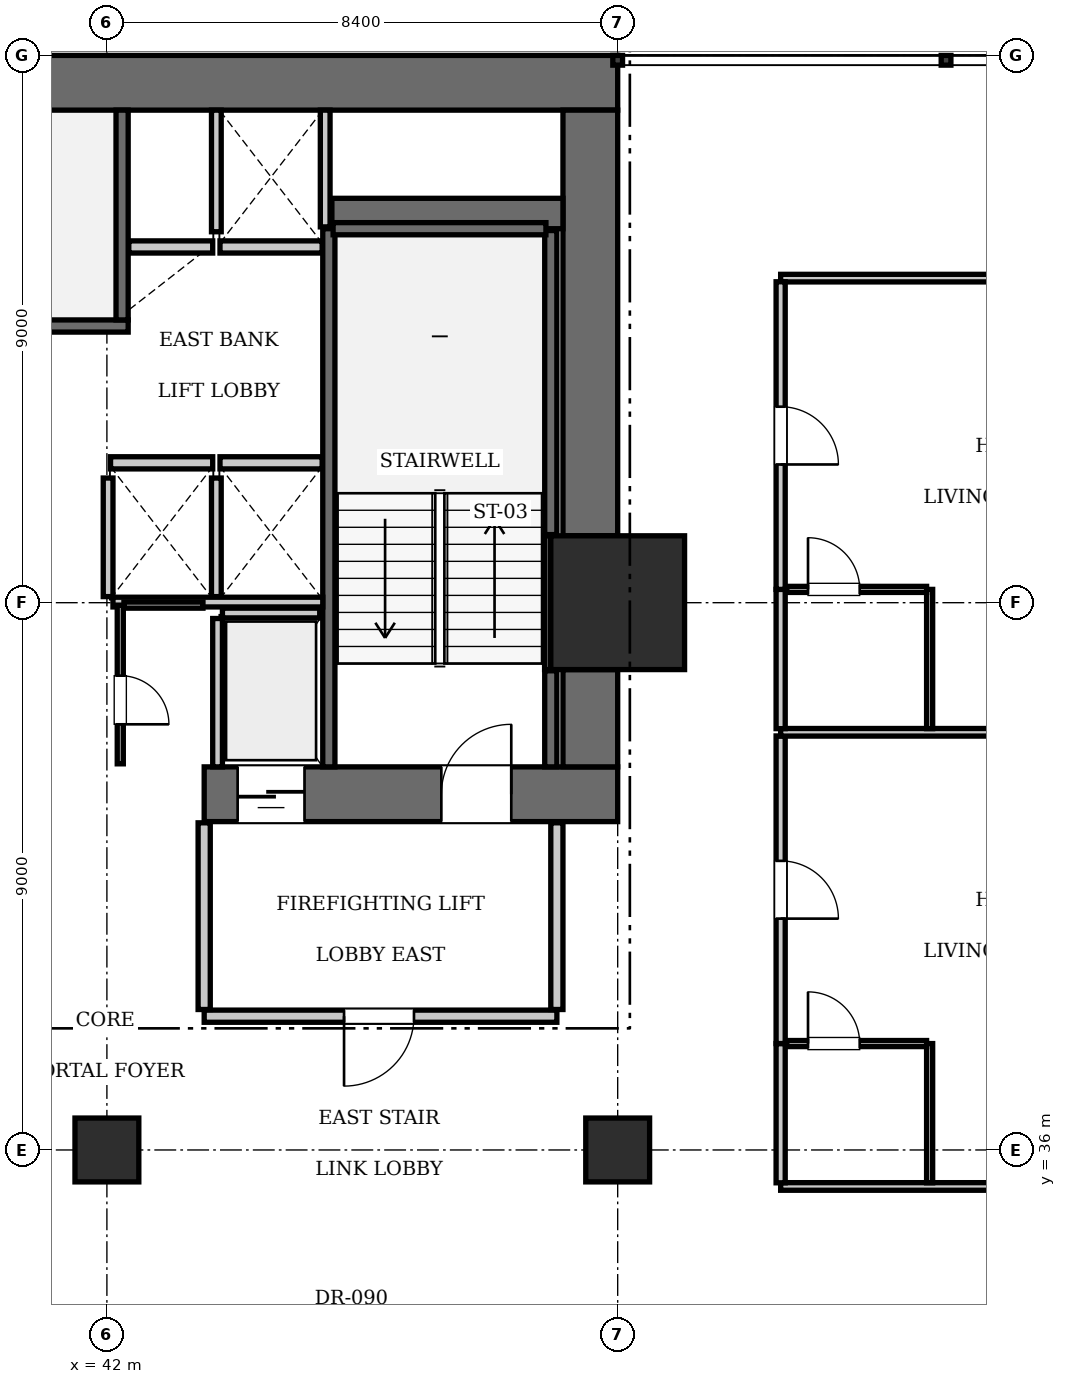
"""IFC4 building model, lengths in metres.
Left out: names, types, materials, properties, quantities, classifications, styles, units other than length and angle.
Written with IfcOpenShell. Run it as: python <this file> out.ifc"""

import sys

from ifc_helpers import new_model, si_unit, direction, frame, frame_2d, origin, origin_2d, place, context, subcontext, project, spatial, rectangle, extrude, element, fill, save


model = new_model("IFC4")
c1 = context("Model", 3, precision=1e-05, world=origin(), true_north=direction((0.0, 1.0)))
c2 = subcontext(c1, "Body", "Model", "MODEL_VIEW")
j1 = project(units=[si_unit("LENGTHUNIT", "METRE"), si_unit("PLANEANGLEUNIT", "RADIAN")], contexts=[c1])
p1 = place(None, origin())
s1 = spatial("IfcSite", under=j1, at=p1, CompositionType="ELEMENT")
p2 = place(p1, origin())
s2 = spatial("IfcBuilding", under=s1, at=p2, CompositionType="ELEMENT")
p3 = place(p2, frame((0.0, 0.0, 46.2)))
s3 = spatial("IfcBuildingStorey", under=s2, at=p3, CompositionType="ELEMENT", Elevation=46.2)
p4 = place(p3, frame((50.4, 45.0, 0.0), z_axis=(0.0, 0.0, 1.0), x_axis=(1.0, 0.0, 0.0)))
e1 = element("IfcColumn", 1, at=p4, inside=s3, PredefinedType="COLUMN", context=c2, shape_type="SweptSolid", body=[
    extrude(rectangle(XDim=2.2, YDim=2.2, at=origin_2d()), origin(), (0.0, 0.0, 1.0), 3.85),
])
p5 = place(p3, frame((25.2, 53.55, 0.0), z_axis=(0.0, 0.0, 1.0), x_axis=(1.0, 0.0, 0.0)))
e2 = element("IfcWall", 2, at=p5, inside=s3, PredefinedType="SHEAR", context=c2, shape_type="SweptSolid", body=[
    extrude(rectangle(XDim=25.2, YDim=0.9, at=frame_2d((12.6, 0.0))), origin(), (0.0, 0.0, 1.0), 3.85),
])
p6 = place(p3, frame((43.6, 41.85, 0.0), z_axis=(0.0, 0.0, 1.0), x_axis=(1.0, 0.0, 0.0)))
e3 = element("IfcWall", 3, at=p6, inside=s3, PredefinedType="SHEAR", context=c2, shape_type="SweptSolid", body=[
    extrude(rectangle(XDim=6.8, YDim=0.9, at=frame_2d((3.4, 0.0))), origin(), (0.0, 0.0, 1.0), 3.85),
])
p7 = place(p6, frame((3.9, 0.0, 0.0)))
e4 = element("IfcOpeningElement", 4, at=p7, cuts=e3, PredefinedType="OPENING", context=c2, shape_type="SweptSolid", body=[
    extrude(rectangle(XDim=1.15, YDim=2.15, at=frame_2d((0.575, 1.075))), frame((0.0, 0.46, 0.0), z_axis=(0.0, -1.0, 0.0), x_axis=(1.0, 0.0, 0.0)), (0.0, 0.0, 1.0), 0.92),
])
p8 = place(p6, frame((0.55, 0.0, 0.0)))
e5 = element("IfcOpeningElement", 5, at=p8, cuts=e3, PredefinedType="OPENING", context=c2, shape_type="SweptSolid", body=[
    extrude(rectangle(XDim=1.1, YDim=2.2, at=frame_2d((0.55, 1.1))), frame((0.0, 0.46, 0.0), z_axis=(0.0, -1.0, 0.0), x_axis=(1.0, 0.0, 0.0)), (0.0, 0.0, 1.0), 0.92),
])
p9 = place(p3, frame((49.95, 42.3, 0.0), z_axis=(0.0, 0.0, 1.0), x_axis=(0.0, 1.0, 0.0)))
e6 = element("IfcWall", 6, at=p9, inside=s3, PredefinedType="SHEAR", context=c2, shape_type="SweptSolid", body=[
    extrude(rectangle(XDim=1.6, YDim=0.9, at=frame_2d((0.8, 0.0))), origin(), (0.0, 0.0, 1.0), 3.85),
])
p10 = place(p3, frame((49.95, 46.1, 0.0), z_axis=(0.0, 0.0, 1.0), x_axis=(0.0, 1.0, 0.0)))
e7 = element("IfcWall", 7, at=p10, inside=s3, PredefinedType="SHEAR", context=c2, shape_type="SweptSolid", body=[
    extrude(rectangle(XDim=7.0, YDim=0.9, at=frame_2d((3.5, 0.0))), origin(), (0.0, 0.0, 1.0), 3.85),
])
p11 = place(p3, frame((45.7, 51.4, 0.0), z_axis=(0.0, 0.0, 1.0), x_axis=(1.0, 0.0, 0.0)))
e8 = element("IfcWall", 8, at=p11, inside=s3, PredefinedType="SHEAR", context=c2, shape_type="SweptSolid", body=[
    extrude(rectangle(XDim=3.8, YDim=0.5, at=frame_2d((1.9, 0.0))), origin(), (0.0, 0.0, 1.0), 3.85),
])
for number, where, z_axis, x_axis in (
    (9, (42.0, 36.0, 0.0), (0.0, 0.0, 1.0), (1.0, 0.0, 0.0)),
    (10, (50.4, 36.0, 0.0), (0.0, 0.0, 1.0), (1.0, 0.0, 0.0)),
):
    element("IfcColumn", number, at=place(p3, frame(where, z_axis=z_axis, x_axis=x_axis)), inside=s3, PredefinedType="COLUMN", context=c2, shape_type="SweptSolid", body=[
        extrude(rectangle(XDim=1.05, YDim=1.05, at=origin_2d()), origin(), (0.0, 0.0, 1.0), 3.85),
    ])
p12 = place(p3, frame((33.25, 49.55, 0.0), z_axis=(0.0, 0.0, 1.0), x_axis=(1.0, 0.0, 0.0)))
e11 = element("IfcWall", 11, at=p12, inside=s3, PredefinedType="SOLIDWALL", context=c2, shape_type="SweptSolid", body=[
    extrude(rectangle(XDim=9.1, YDim=0.2, at=frame_2d((4.55, 0.0))), origin(), (0.0, 0.0, 1.0), 3.61),
])
p13 = place(p3, frame((42.25, 49.65, 0.0), z_axis=(0.0, 0.0, 1.0), x_axis=(0.0, 1.0, 0.0)))
e12 = element("IfcWall", 12, at=p13, inside=s3, PredefinedType="SOLIDWALL", context=c2, shape_type="SweptSolid", body=[
    extrude(rectangle(XDim=3.45, YDim=0.2, at=frame_2d((1.725, 0.0))), origin(), (0.0, 0.0, 1.0), 3.61),
])
p14 = place(p3, frame((45.65, 42.3, 0.0), z_axis=(0.0, 0.0, 1.0), x_axis=(0.0, 1.0, 0.0)))
e13 = element("IfcWall", 13, at=p14, inside=s3, PredefinedType="SOLIDWALL", context=c2, shape_type="SweptSolid", body=[
    extrude(rectangle(XDim=8.85, YDim=0.2, at=frame_2d((4.425, 0.0))), origin(), (0.0, 0.0, 1.0), 3.61),
])
p15 = place(p3, frame((49.3, 42.3, 0.0), z_axis=(0.0, 0.0, 1.0), x_axis=(0.0, 1.0, 0.0)))
e14 = element("IfcWall", 14, at=p15, inside=s3, PredefinedType="SOLIDWALL", context=c2, shape_type="SweptSolid", body=[
    extrude(rectangle(XDim=1.58, YDim=0.2, at=frame_2d((0.79, 0.0))), origin(), (0.0, 0.0, 1.0), 3.61),
])
p16 = place(p3, frame((49.3, 46.12, 0.0), z_axis=(0.0, 0.0, 1.0), x_axis=(0.0, 1.0, 0.0)))
e15 = element("IfcWall", 15, at=p16, inside=s3, PredefinedType="SOLIDWALL", context=c2, shape_type="SweptSolid", body=[
    extrude(rectangle(XDim=5.0, YDim=0.2, at=frame_2d((2.5, 0.0))), origin(), (0.0, 0.0, 1.0), 3.61),
])
p17 = place(p3, frame((45.72, 51.15, 0.0), z_axis=(0.0, 0.0, 1.0), x_axis=(1.0, 0.0, 0.0)))
e16 = element("IfcWall", 16, at=p17, inside=s3, PredefinedType="SOLIDWALL", context=c2, shape_type="SweptSolid", body=[
    extrude(rectangle(XDim=3.5, YDim=0.2, at=frame_2d((1.75, 0.0))), origin(), (0.0, 0.0, 1.0), 3.61),
])
p18 = place(p3, frame((49.248, 43.9, 0.0), z_axis=(0.0, 0.0, 1.0), x_axis=(0.0, 1.0, 0.0)))
e17 = element("IfcWall", 17, at=p18, inside=s3, PredefinedType="SOLIDWALL", context=c2, shape_type="SweptSolid", body=[
    extrude(rectangle(XDim=2.2, YDim=0.1, at=frame_2d((1.1, 0.0))), origin(), (0.0, 0.0, 1.0), 3.61),
])
for number, where, z_axis, x_axis in (
    (18, (42.06, 47.3, 0.0), (0.0, 0.0, 1.0), (1.0, 0.0, 0.0)),
    (19, (43.86, 47.3, 0.0), (0.0, 0.0, 1.0), (1.0, 0.0, 0.0)),
):
    element("IfcWall", number, at=place(p3, frame(where, z_axis=z_axis, x_axis=x_axis)), inside=s3, PredefinedType="SOLIDWALL", context=c2, shape_type="SweptSolid", body=[
        extrude(rectangle(XDim=1.68, YDim=0.2, at=frame_2d((0.84, 0.0))), origin(), (0.0, 0.0, 1.0), 3.61),
    ])
p19 = place(p3, frame((42.36, 50.85, 0.0), z_axis=(0.0, 0.0, 1.0), x_axis=(1.0, 0.0, 0.0)))
e20 = element("IfcWall", 20, at=p19, inside=s3, PredefinedType="SOLIDWALL", context=c2, shape_type="SweptSolid", body=[
    extrude(rectangle(XDim=1.38, YDim=0.2, at=frame_2d((0.69, 0.0))), origin(), (0.0, 0.0, 1.0), 3.61),
])
p20 = place(p3, frame((43.86, 50.85, 0.0), z_axis=(0.0, 0.0, 1.0), x_axis=(1.0, 0.0, 0.0)))
e21 = element("IfcWall", 21, at=p20, inside=s3, PredefinedType="SOLIDWALL", context=c2, shape_type="SweptSolid", body=[
    extrude(rectangle(XDim=1.68, YDim=0.2, at=frame_2d((0.84, 0.0))), origin(), (0.0, 0.0, 1.0), 3.61),
])
p21 = place(p3, frame((43.9, 44.83, 0.0), z_axis=(0.0, 0.0, 1.0), x_axis=(1.0, 0.0, 0.0)))
e22 = element("IfcWall", 22, at=p21, inside=s3, PredefinedType="SOLIDWALL", context=c2, shape_type="SweptSolid", body=[
    extrude(rectangle(XDim=1.6, YDim=0.16, at=frame_2d((0.8, 0.0))), origin(), (0.0, 0.0, 1.0), 3.61),
])
p22 = place(p3, frame((43.82, 42.3, 0.0), z_axis=(0.0, 0.0, 1.0), x_axis=(0.0, 1.0, 0.0)))
e23 = element("IfcWall", 23, at=p22, inside=s3, PredefinedType="SOLIDWALL", context=c2, shape_type="SweptSolid", body=[
    extrude(rectangle(XDim=2.44, YDim=0.16, at=frame_2d((1.22, 0.0))), origin(), (0.0, 0.0, 1.0), 3.61),
])
for number, where, z_axis, x_axis in (
    (24, (42.02, 45.1, 0.0), (0.0, 0.0, 1.0), (0.0, 1.0, 0.0)),
    (25, (43.8, 45.1, 0.0), (0.0, 0.0, 1.0), (0.0, 1.0, 0.0)),
):
    element("IfcWall", number, at=place(p3, frame(where, z_axis=z_axis, x_axis=x_axis)), inside=s3, PredefinedType="SOLIDWALL", context=c2, shape_type="SweptSolid", body=[
        extrude(rectangle(XDim=1.95, YDim=0.16, at=frame_2d((0.975, 0.0))), origin(), (0.0, 0.0, 1.0), 3.61),
    ])
p23 = place(p3, frame((42.1, 45.01, 0.0), z_axis=(0.0, 0.0, 1.0), x_axis=(1.0, 0.0, 0.0)))
e26 = element("IfcWall", 26, at=p23, inside=s3, PredefinedType="SOLIDWALL", context=c2, shape_type="SweptSolid", body=[
    extrude(rectangle(XDim=3.45, YDim=0.16, at=frame_2d((1.725, 0.0))), origin(), (0.0, 0.0, 1.0), 3.61),
])
p24 = place(p3, frame((45.59, 51.18, 0.0), z_axis=(0.0, 0.0, 1.0), x_axis=(0.0, 1.0, 0.0)))
e27 = element("IfcWall", 27, at=p24, inside=s3, PredefinedType="SOLIDWALL", context=c2, shape_type="SweptSolid", body=[
    extrude(rectangle(XDim=1.92, YDim=0.16, at=frame_2d((0.96, 0.0))), origin(), (0.0, 0.0, 1.0), 3.61),
])
p25 = place(p3, frame((43.8, 51.1, 0.0), z_axis=(0.0, 0.0, 1.0), x_axis=(0.0, 1.0, 0.0)))
e28 = element("IfcWall", 28, at=p25, inside=s3, PredefinedType="SOLIDWALL", context=c2, shape_type="SweptSolid", body=[
    extrude(rectangle(XDim=2.0, YDim=0.16, at=frame_2d((1.0, 0.0))), origin(), (0.0, 0.0, 1.0), 3.61),
])
p26 = place(p3, frame((43.6, 38.2, 0.0), z_axis=(0.0, 0.0, 1.0), x_axis=(1.0, 0.0, 0.0)))
e29 = element("IfcWall", 29, at=p26, inside=s3, PredefinedType="PARTITIONING", context=c2, shape_type="SweptSolid", body=[
    extrude(rectangle(XDim=5.8, YDim=0.2, at=frame_2d((2.9, 0.0))), origin(), (0.0, 0.0, 1.0), 3.61),
])
p27 = place(p26, frame((2.3, 0.0, 0.0)))
e30 = element("IfcOpeningElement", 30, at=p27, cuts=e29, PredefinedType="OPENING", context=c2, shape_type="SweptSolid", body=[
    extrude(rectangle(XDim=1.15, YDim=2.15, at=frame_2d((0.575, 1.075))), frame((0.0, 0.11, 0.0), z_axis=(0.0, -1.0, 0.0), x_axis=(1.0, 0.0, 0.0)), (0.0, 0.0, 1.0), 0.22),
])
for number, where, z_axis, x_axis in (
    (31, (43.6, 38.31, 0.0), (0.0, 0.0, 1.0), (0.0, 1.0, 0.0)),
    (32, (49.4, 38.31, 0.0), (0.0, 0.0, 1.0), (0.0, 1.0, 0.0)),
):
    element("IfcWall", number, at=place(p3, frame(where, z_axis=z_axis, x_axis=x_axis)), inside=s3, PredefinedType="PARTITIONING", context=c2, shape_type="SweptSolid", body=[
        extrude(rectangle(XDim=3.07, YDim=0.2, at=frame_2d((1.535, 0.0))), origin(), (0.0, 0.0, 1.0), 3.61),
    ])
p28 = place(p3, frame((42.22, 42.35, 0.0), z_axis=(0.0, 0.0, 1.0), x_axis=(0.0, 1.0, 0.0)))
e33 = element("IfcWall", 33, at=p28, inside=s3, PredefinedType="PARTITIONING", context=c2, shape_type="SweptSolid", body=[
    extrude(rectangle(XDim=2.61, YDim=0.1, at=frame_2d((1.305, 0.0))), origin(), (0.0, 0.0, 1.0), 3.61),
])
p29 = place(p28, frame((0.65, 0.0, 0.0)))
e34 = element("IfcOpeningElement", 34, at=p29, cuts=e33, PredefinedType="OPENING", context=c2, shape_type="SweptSolid", body=[
    extrude(rectangle(XDim=0.8, YDim=2.05, at=frame_2d((0.4, 1.025))), frame((0.0, 0.06, 0.0), z_axis=(0.0, -1.0, 0.0), x_axis=(1.0, 0.0, 0.0)), (0.0, 0.0, 1.0), 0.12),
])
p30 = place(p3, frame((42.28, 44.96, 0.0), z_axis=(0.0, 0.0, 1.0), x_axis=(1.0, 0.0, 0.0)))
e35 = element("IfcWall", 35, at=p30, inside=s3, PredefinedType="PARTITIONING", context=c2, shape_type="SweptSolid", body=[
    extrude(rectangle(XDim=1.3, YDim=0.1, at=frame_2d((0.65, 0.0))), origin(), (0.0, 0.0, 1.0), 3.61),
])
p31 = place(p3, frame((53.08, 35.4, 0.0), z_axis=(0.0, 0.0, 1.0), x_axis=(1.0, 0.0, 0.0)))
e36 = element("IfcWall", 36, at=p31, inside=s3, PredefinedType="PARTITIONING", context=c2, shape_type="SweptSolid", body=[
    extrude(rectangle(XDim=11.62, YDim=0.125, at=frame_2d((5.81, 0.0))), origin(), (0.0, 0.0, 1.0), 3.61),
])
p32 = place(p3, frame((53.08, 50.337, 0.0), z_axis=(0.0, 0.0, 1.0), x_axis=(1.0, 0.0, 0.0)))
e37 = element("IfcWall", 37, at=p32, inside=s3, PredefinedType="PARTITIONING", context=c2, shape_type="SweptSolid", body=[
    extrude(rectangle(XDim=8.38, YDim=0.125, at=frame_2d((4.19, 0.0))), origin(), (0.0, 0.0, 1.0), 3.61),
])
p33 = place(p3, frame((53.08, 35.46, 0.0), z_axis=(0.0, 0.0, 1.0), x_axis=(0.0, 1.0, 0.0)))
e38 = element("IfcWall", 38, at=p33, inside=s3, PredefinedType="PARTITIONING", context=c2, shape_type="SweptSolid", body=[
    extrude(rectangle(XDim=2.29, YDim=0.15, at=frame_2d((1.145, 0.0))), origin(), (0.0, 0.0, 1.0), 3.61),
])
p34 = place(p3, frame((53.08, 37.75, 0.0), z_axis=(0.0, 0.0, 1.0), x_axis=(0.0, 1.0, 0.0)))
e39 = element("IfcWall", 39, at=p34, inside=s3, PredefinedType="PARTITIONING", context=c2, shape_type="SweptSolid", body=[
    extrude(rectangle(XDim=5.059, YDim=0.15, at=frame_2d((2.529, 0.0))), origin(), (0.0, 0.0, 1.0), 3.61),
])
p35 = place(p34, frame((2.054, 0.0, 0.0)))
e40 = element("IfcOpeningElement", 40, at=p35, cuts=e39, PredefinedType="OPENING", context=c2, shape_type="SweptSolid", body=[
    extrude(rectangle(XDim=0.95, YDim=2.15, at=frame_2d((0.475, 1.075))), frame((0.0, 0.085, 0.0), z_axis=(0.0, -1.0, 0.0), x_axis=(1.0, 0.0, 0.0)), (0.0, 0.0, 1.0), 0.17),
])
p36 = place(p3, frame((55.53, 35.46, 0.0), z_axis=(0.0, 0.0, 1.0), x_axis=(0.0, 1.0, 0.0)))
e41 = element("IfcWall", 41, at=p36, inside=s3, PredefinedType="PARTITIONING", context=c2, shape_type="SweptSolid", body=[
    extrude(rectangle(XDim=2.29, YDim=0.1, at=frame_2d((1.145, 0.0))), origin(), (0.0, 0.0, 1.0), 3.61),
])
p37 = place(p3, frame((53.18, 37.75, 0.0), z_axis=(0.0, 0.0, 1.0), x_axis=(1.0, 0.0, 0.0)))
e42 = element("IfcWall", 42, at=p37, inside=s3, PredefinedType="PARTITIONING", context=c2, shape_type="SweptSolid", body=[
    extrude(rectangle(XDim=2.3, YDim=0.1, at=frame_2d((1.15, 0.0))), origin(), (0.0, 0.0, 1.0), 3.61),
])
p38 = place(p37, frame((0.35, 0.0, 0.0)))
e43 = element("IfcOpeningElement", 43, at=p38, cuts=e42, PredefinedType="OPENING", context=c2, shape_type="SweptSolid", body=[
    extrude(rectangle(XDim=0.85, YDim=2.1, at=frame_2d((0.425, 1.05))), frame((0.0, 0.06, 0.0), z_axis=(0.0, -1.0, 0.0), x_axis=(1.0, 0.0, 0.0)), (0.0, 0.0, 1.0), 0.12),
])
p39 = place(p3, frame((53.08, 42.869, 0.0), z_axis=(0.0, 0.0, 1.0), x_axis=(1.0, 0.0, 0.0)))
e44 = element("IfcWall", 44, at=p39, inside=s3, PredefinedType="PARTITIONING", context=c2, shape_type="SweptSolid", body=[
    extrude(rectangle(XDim=11.62, YDim=0.125, at=frame_2d((5.81, 0.0))), origin(), (0.0, 0.0, 1.0), 3.61),
])
p40 = place(p3, frame((53.08, 42.929, 0.0), z_axis=(0.0, 0.0, 1.0), x_axis=(0.0, 1.0, 0.0)))
e45 = element("IfcWall", 45, at=p40, inside=s3, PredefinedType="PARTITIONING", context=c2, shape_type="SweptSolid", body=[
    extrude(rectangle(XDim=2.29, YDim=0.15, at=frame_2d((1.145, 0.0))), origin(), (0.0, 0.0, 1.0), 3.61),
])
p41 = place(p3, frame((53.08, 45.219, 0.0), z_axis=(0.0, 0.0, 1.0), x_axis=(0.0, 1.0, 0.0)))
e46 = element("IfcWall", 46, at=p41, inside=s3, PredefinedType="PARTITIONING", context=c2, shape_type="SweptSolid", body=[
    extrude(rectangle(XDim=5.059, YDim=0.15, at=frame_2d((2.529, 0.0))), origin(), (0.0, 0.0, 1.0), 3.61),
])
p42 = place(p41, frame((2.054, 0.0, 0.0)))
e47 = element("IfcOpeningElement", 47, at=p42, cuts=e46, PredefinedType="OPENING", context=c2, shape_type="SweptSolid", body=[
    extrude(rectangle(XDim=0.95, YDim=2.15, at=frame_2d((0.475, 1.075))), frame((0.0, 0.085, 0.0), z_axis=(0.0, -1.0, 0.0), x_axis=(1.0, 0.0, 0.0)), (0.0, 0.0, 1.0), 0.17),
])
p43 = place(p3, frame((55.53, 42.929, 0.0), z_axis=(0.0, 0.0, 1.0), x_axis=(0.0, 1.0, 0.0)))
e48 = element("IfcWall", 48, at=p43, inside=s3, PredefinedType="PARTITIONING", context=c2, shape_type="SweptSolid", body=[
    extrude(rectangle(XDim=2.29, YDim=0.1, at=frame_2d((1.145, 0.0))), origin(), (0.0, 0.0, 1.0), 3.61),
])
p44 = place(p3, frame((53.18, 45.219, 0.0), z_axis=(0.0, 0.0, 1.0), x_axis=(1.0, 0.0, 0.0)))
e49 = element("IfcWall", 49, at=p44, inside=s3, PredefinedType="PARTITIONING", context=c2, shape_type="SweptSolid", body=[
    extrude(rectangle(XDim=2.3, YDim=0.1, at=frame_2d((1.15, 0.0))), origin(), (0.0, 0.0, 1.0), 3.61),
])
p45 = place(p44, frame((0.35, 0.0, 0.0)))
e50 = element("IfcOpeningElement", 50, at=p45, cuts=e49, PredefinedType="OPENING", context=c2, shape_type="SweptSolid", body=[
    extrude(rectangle(XDim=0.85, YDim=2.1, at=frame_2d((0.425, 1.05))), frame((0.0, 0.06, 0.0), z_axis=(0.0, -1.0, 0.0), x_axis=(1.0, 0.0, 0.0)), (0.0, 0.0, 1.0), 0.12),
])
p46 = place(p7, origin())
e51 = element("IfcDoor", 51, at=p46, inside=s3, OperationType="SINGLE_SWING_RIGHT", PredefinedType="DOOR", context=c2, shape_type="SweptSolid", body=[
    extrude(rectangle(XDim=1.15, YDim=2.15, at=frame_2d((0.575, 1.075))), frame((0.0, 0.025, 0.0), z_axis=(0.0, -1.0, 0.0), x_axis=(1.0, 0.0, 0.0)), (0.0, 0.0, 1.0), 0.05),
])
fill(e4, e51)
p47 = place(p8, frame((1.1, 0.0, 0.0), z_axis=(0.0, 0.0, 1.0), x_axis=(-1.0, 0.0, 0.0)))
e52 = element("IfcDoor", 52, at=p47, inside=s3, OperationType="SLIDING_TO_LEFT", PredefinedType="DOOR", context=c2, shape_type="SweptSolid", body=[
    extrude(rectangle(XDim=1.1, YDim=2.2, at=frame_2d((0.55, 1.1))), frame((0.0, 0.025, 0.0), z_axis=(0.0, -1.0, 0.0), x_axis=(1.0, 0.0, 0.0)), (0.0, 0.0, 1.0), 0.05),
])
fill(e5, e52)
p48 = place(p27, frame((1.15, 0.0, 0.0), z_axis=(0.0, 0.0, 1.0), x_axis=(-1.0, 0.0, 0.0)))
e53 = element("IfcDoor", 53, at=p48, inside=s3, OperationType="SINGLE_SWING_RIGHT", PredefinedType="DOOR", context=c2, shape_type="SweptSolid", body=[
    extrude(rectangle(XDim=1.15, YDim=2.15, at=frame_2d((0.575, 1.075))), frame((0.0, 0.025, 0.0), z_axis=(0.0, -1.0, 0.0), x_axis=(1.0, 0.0, 0.0)), (0.0, 0.0, 1.0), 0.05),
])
fill(e30, e53)
p49 = place(p29, frame((0.8, 0.0, 0.0), z_axis=(0.0, 0.0, 1.0), x_axis=(-1.0, 0.0, 0.0)))
e54 = element("IfcDoor", 54, at=p49, inside=s3, OperationType="SINGLE_SWING_RIGHT", PredefinedType="DOOR", context=c2, shape_type="SweptSolid", body=[
    extrude(rectangle(XDim=0.8, YDim=2.05, at=frame_2d((0.4, 1.025))), frame((0.0, 0.025, 0.0), z_axis=(0.0, -1.0, 0.0), x_axis=(1.0, 0.0, 0.0)), (0.0, 0.0, 1.0), 0.05),
])
fill(e34, e54)
p50 = place(p38, origin())
e55 = element("IfcDoor", 55, at=p50, inside=s3, OperationType="SINGLE_SWING_LEFT", PredefinedType="DOOR", context=c2, shape_type="SweptSolid", body=[
    extrude(rectangle(XDim=0.85, YDim=2.1, at=frame_2d((0.425, 1.05))), frame((0.0, 0.025, 0.0), z_axis=(0.0, -1.0, 0.0), x_axis=(1.0, 0.0, 0.0)), (0.0, 0.0, 1.0), 0.05),
])
fill(e43, e55)
p51 = place(p35, frame((0.95, 0.0, 0.0), z_axis=(0.0, 0.0, 1.0), x_axis=(-1.0, 0.0, 0.0)))
e56 = element("IfcDoor", 56, at=p51, inside=s3, OperationType="SINGLE_SWING_RIGHT", PredefinedType="DOOR", context=c2, shape_type="SweptSolid", body=[
    extrude(rectangle(XDim=0.95, YDim=2.15, at=frame_2d((0.475, 1.075))), frame((0.0, 0.025, 0.0), z_axis=(0.0, -1.0, 0.0), x_axis=(1.0, 0.0, 0.0)), (0.0, 0.0, 1.0), 0.05),
])
fill(e40, e56)
p52 = place(p45, origin())
e57 = element("IfcDoor", 57, at=p52, inside=s3, OperationType="SINGLE_SWING_LEFT", PredefinedType="DOOR", context=c2, shape_type="SweptSolid", body=[
    extrude(rectangle(XDim=0.85, YDim=2.1, at=frame_2d((0.425, 1.05))), frame((0.0, 0.025, 0.0), z_axis=(0.0, -1.0, 0.0), x_axis=(1.0, 0.0, 0.0)), (0.0, 0.0, 1.0), 0.05),
])
fill(e50, e57)
p53 = place(p42, frame((0.95, 0.0, 0.0), z_axis=(0.0, 0.0, 1.0), x_axis=(-1.0, 0.0, 0.0)))
e58 = element("IfcDoor", 58, at=p53, inside=s3, OperationType="SINGLE_SWING_RIGHT", PredefinedType="DOOR", context=c2, shape_type="SweptSolid", body=[
    extrude(rectangle(XDim=0.95, YDim=2.15, at=frame_2d((0.475, 1.075))), frame((0.0, 0.025, 0.0), z_axis=(0.0, -1.0, 0.0), x_axis=(1.0, 0.0, 0.0)), (0.0, 0.0, 1.0), 0.05),
])
fill(e47, e58)
save(model, sys.argv[1])
